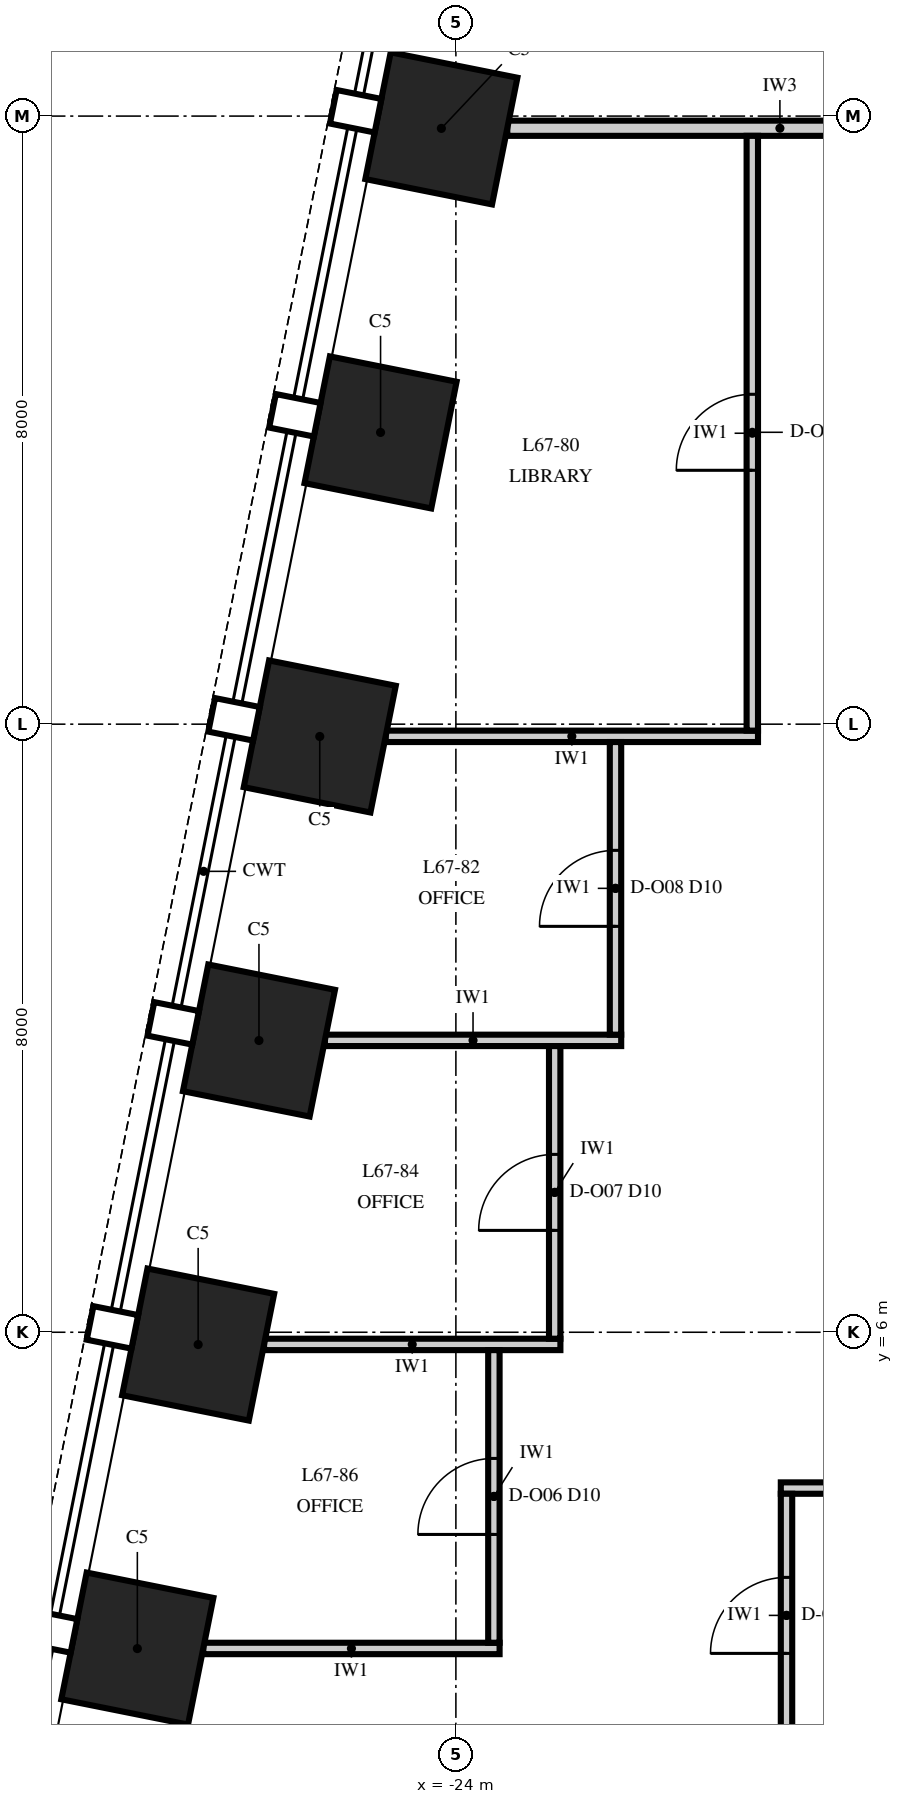
"""IFC4 building model, lengths in metres.
Left out: names, types, materials, properties, quantities, classifications, styles, units other than length and angle.
Written with IfcOpenShell. Run it as: python <this file> out.ifc"""

import sys

from ifc_helpers import new_model, si_unit, direction, frame, frame_2d, origin, origin_2d, place, context, subcontext, project, spatial, rectangle, extrude, element, fill, save


model = new_model("IFC4")
c1 = context("Model", 3, precision=1e-05, world=origin(), true_north=direction((0.0, 1.0)))
c2 = subcontext(c1, "Body", "Model", "MODEL_VIEW")
j1 = project(units=[si_unit("LENGTHUNIT", "METRE"), si_unit("PLANEANGLEUNIT", "RADIAN")], contexts=[c1])
p1 = place(None, origin())
s1 = spatial("IfcSite", under=j1, at=p1, CompositionType="ELEMENT")
p2 = place(p1, origin())
s2 = spatial("IfcBuilding", under=s1, at=p2, CompositionType="ELEMENT")
p3 = place(p2, frame((0.0, 0.0, 288.0)))
s3 = spatial("IfcBuildingStorey", under=s2, at=p3, CompositionType="ELEMENT", Elevation=288.0)
for number, where, z_axis, x_axis in (
    (1, (-24.191, 21.838, 0.0), (0.0, 0.0, 1.0), (-0.196, -0.981, 0.0)),
    (2, (-24.991, 17.838, 0.0), (0.0, 0.0, 1.0), (-0.196, -0.981, 0.0)),
    (3, (-25.791, 13.838, 0.0), (0.0, 0.0, 1.0), (-0.196, -0.981, 0.0)),
    (4, (-26.591, 9.838, 0.0), (0.0, 0.0, 1.0), (-0.196, -0.981, 0.0)),
    (5, (-27.391, 5.838, 0.0), (0.0, 0.0, 1.0), (-0.196, -0.981, 0.0)),
    (6, (-28.191, 1.838, 0.0), (0.0, 0.0, 1.0), (-0.196, -0.981, 0.0)),
):
    element("IfcColumn", number, at=place(p3, frame(where, z_axis=z_axis, x_axis=x_axis)), inside=s3, PredefinedType="COLUMN", context=c2, shape_type="SweptSolid", body=[
        extrude(rectangle(XDim=1.7, YDim=1.7, at=origin_2d()), origin(), (0.0, 0.0, 1.0), 4.0),
    ])
p4 = place(p3, frame((-27.324, 1.84, 0.0), z_axis=(0.0, 0.0, 1.0), x_axis=(1.0, 0.0, 0.0)))
e7 = element("IfcWall", 7, at=p4, inside=s3, PredefinedType="PARTITIONING", context=c2, shape_type="SweptSolid", body=[
    extrude(rectangle(XDim=3.899, YDim=0.15, at=frame_2d((1.949, 0.0))), origin(), (0.0, 0.0, 1.0), 3.23),
])
p5 = place(p3, frame((-19.725, 3.95, 0.0), z_axis=(0.0, 0.0, 1.0), x_axis=(1.0, 0.0, 0.0)))
e8 = element("IfcWall", 8, at=p5, inside=s3, PredefinedType="PARTITIONING", context=c2, shape_type="SweptSolid", body=[
    extrude(rectangle(XDim=3.675, YDim=0.15, at=frame_2d((1.837, 0.0))), origin(), (0.0, 0.0, 1.0), 3.23),
])
p6 = place(p3, frame((-26.524, 5.84, 0.0), z_axis=(0.0, 0.0, 1.0), x_axis=(1.0, 0.0, 0.0)))
e9 = element("IfcWall", 9, at=p6, inside=s3, PredefinedType="PARTITIONING", context=c2, shape_type="SweptSolid", body=[
    extrude(rectangle(XDim=3.899, YDim=0.15, at=frame_2d((1.949, 0.0))), origin(), (0.0, 0.0, 1.0), 2.842),
])
p7 = place(p3, frame((-25.724, 9.84, 0.0), z_axis=(0.0, 0.0, 1.0), x_axis=(1.0, 0.0, 0.0)))
e10 = element("IfcWall", 10, at=p7, inside=s3, PredefinedType="PARTITIONING", context=c2, shape_type="SweptSolid", body=[
    extrude(rectangle(XDim=3.899, YDim=0.15, at=frame_2d((1.949, 0.0))), origin(), (0.0, 0.0, 1.0), 3.23),
])
p8 = place(p3, frame((-24.924, 13.84, 0.0), z_axis=(0.0, 0.0, 1.0), x_axis=(1.0, 0.0, 0.0)))
e11 = element("IfcWall", 11, at=p8, inside=s3, PredefinedType="PARTITIONING", context=c2, shape_type="SweptSolid", body=[
    extrude(rectangle(XDim=4.899, YDim=0.15, at=frame_2d((2.449, 0.0))), origin(), (0.0, 0.0, 1.0), 3.23),
])
p9 = place(p3, frame((-23.324, 21.84, 0.0), z_axis=(0.0, 0.0, 1.0), x_axis=(1.0, 0.0, 0.0)))
e12 = element("IfcWall", 12, at=p9, inside=s3, PredefinedType="PARTITIONING", context=c2, shape_type="SweptSolid", body=[
    extrude(rectangle(XDim=7.174, YDim=0.2, at=frame_2d((3.587, 0.0))), origin(), (0.0, 0.0, 1.0), 3.23),
])
p10 = place(p3, frame((-23.5, 1.915, 0.0), z_axis=(0.0, 0.0, 1.0), x_axis=(0.0, 1.0, 0.0)))
e13 = element("IfcWall", 13, at=p10, inside=s3, PredefinedType="PARTITIONING", context=c2, shape_type="SweptSolid", body=[
    extrude(rectangle(XDim=3.85, YDim=0.15, at=frame_2d((1.925, 0.0))), origin(), (0.0, 0.0, 1.0), 3.85),
])
p11 = place(p10, frame((1.425, 0.0, 0.0)))
e14 = element("IfcOpeningElement", 14, at=p11, cuts=e13, PredefinedType="OPENING", context=c2, shape_type="SweptSolid", body=[
    extrude(rectangle(XDim=1.0, YDim=2.3, at=frame_2d((0.5, 1.15))), frame((0.0, 0.09, 0.0), z_axis=(0.0, -1.0, 0.0), x_axis=(1.0, 0.0, 0.0)), (0.0, 0.0, 1.0), 0.18),
])
p12 = place(p3, frame((-22.7, 5.915, 0.0), z_axis=(0.0, 0.0, 1.0), x_axis=(0.0, 1.0, 0.0)))
e15 = element("IfcWall", 15, at=p12, inside=s3, PredefinedType="PARTITIONING", context=c2, shape_type="SweptSolid", body=[
    extrude(rectangle(XDim=3.85, YDim=0.15, at=frame_2d((1.925, 0.0))), origin(), (0.0, 0.0, 1.0), 2.842),
])
p13 = place(p12, frame((1.425, 0.0, 0.0)))
e16 = element("IfcOpeningElement", 16, at=p13, cuts=e15, PredefinedType="OPENING", context=c2, shape_type="SweptSolid", body=[
    extrude(rectangle(XDim=1.0, YDim=2.3, at=frame_2d((0.5, 1.15))), frame((0.0, 0.09, 0.0), z_axis=(0.0, -1.0, 0.0), x_axis=(1.0, 0.0, 0.0)), (0.0, 0.0, 1.0), 0.18),
])
p14 = place(p3, frame((-21.9, 9.915, 0.0), z_axis=(0.0, 0.0, 1.0), x_axis=(0.0, 1.0, 0.0)))
e17 = element("IfcWall", 17, at=p14, inside=s3, PredefinedType="PARTITIONING", context=c2, shape_type="SweptSolid", body=[
    extrude(rectangle(XDim=3.85, YDim=0.15, at=frame_2d((1.925, 0.0))), origin(), (0.0, 0.0, 1.0), 3.85),
])
p15 = place(p14, frame((1.425, 0.0, 0.0)))
e18 = element("IfcOpeningElement", 18, at=p15, cuts=e17, PredefinedType="OPENING", context=c2, shape_type="SweptSolid", body=[
    extrude(rectangle(XDim=1.0, YDim=2.3, at=frame_2d((0.5, 1.15))), frame((0.0, 0.09, 0.0), z_axis=(0.0, -1.0, 0.0), x_axis=(1.0, 0.0, 0.0)), (0.0, 0.0, 1.0), 0.18),
])
p16 = place(p3, frame((-20.1, 13.915, 0.0), z_axis=(0.0, 0.0, 1.0), x_axis=(0.0, 1.0, 0.0)))
e19 = element("IfcWall", 19, at=p16, inside=s3, PredefinedType="PARTITIONING", context=c2, shape_type="SweptSolid", body=[
    extrude(rectangle(XDim=7.825, YDim=0.15, at=frame_2d((3.913, 0.0))), origin(), (0.0, 0.0, 1.0), 3.23),
])
p17 = place(p16, frame((3.425, 0.0, 0.0)))
e20 = element("IfcOpeningElement", 20, at=p17, cuts=e19, PredefinedType="OPENING", context=c2, shape_type="SweptSolid", body=[
    extrude(rectangle(XDim=1.0, YDim=2.3, at=frame_2d((0.5, 1.15))), frame((0.0, 0.09, 0.0), z_axis=(0.0, -1.0, 0.0), x_axis=(1.0, 0.0, 0.0)), (0.0, 0.0, 1.0), 0.18),
])
p18 = place(p3, frame((-19.65, 0.675, 0.0), z_axis=(0.0, 0.0, 1.0), x_axis=(0.0, 1.0, 0.0)))
e21 = element("IfcWall", 21, at=p18, inside=s3, PredefinedType="PARTITIONING", context=c2, shape_type="SweptSolid", body=[
    extrude(rectangle(XDim=3.2, YDim=0.15, at=frame_2d((1.6, 0.0))), origin(), (0.0, 0.0, 1.0), 3.85),
])
p19 = place(p18, frame((1.1, 0.0, 0.0)))
e22 = element("IfcOpeningElement", 22, at=p19, cuts=e21, PredefinedType="OPENING", context=c2, shape_type="SweptSolid", body=[
    extrude(rectangle(XDim=1.0, YDim=2.3, at=frame_2d((0.5, 1.15))), frame((0.0, 0.09, 0.0), z_axis=(0.0, -1.0, 0.0), x_axis=(1.0, 0.0, 0.0)), (0.0, 0.0, 1.0), 0.18),
])
p20 = place(p11, origin())
e23 = element("IfcDoor", 23, at=p20, inside=s3, OperationType="SINGLE_SWING_LEFT", PredefinedType="DOOR", context=c2, shape_type="SweptSolid", body=[
    extrude(rectangle(XDim=1.0, YDim=2.3, at=frame_2d((0.5, 1.15))), frame((0.0, 0.075, 0.0), z_axis=(0.0, -1.0, 0.0), x_axis=(1.0, 0.0, 0.0)), (0.0, 0.0, 1.0), 0.149),
])
fill(e14, e23)
p21 = place(p13, origin())
e24 = element("IfcDoor", 24, at=p21, inside=s3, OperationType="SINGLE_SWING_LEFT", PredefinedType="DOOR", context=c2, shape_type="SweptSolid", body=[
    extrude(rectangle(XDim=1.0, YDim=2.3, at=frame_2d((0.5, 1.15))), frame((0.0, 0.075, 0.0), z_axis=(0.0, -1.0, 0.0), x_axis=(1.0, 0.0, 0.0)), (0.0, 0.0, 1.0), 0.149),
])
fill(e16, e24)
p22 = place(p15, origin())
e25 = element("IfcDoor", 25, at=p22, inside=s3, OperationType="SINGLE_SWING_LEFT", PredefinedType="DOOR", context=c2, shape_type="SweptSolid", body=[
    extrude(rectangle(XDim=1.0, YDim=2.3, at=frame_2d((0.5, 1.15))), frame((0.0, 0.075, 0.0), z_axis=(0.0, -1.0, 0.0), x_axis=(1.0, 0.0, 0.0)), (0.0, 0.0, 1.0), 0.149),
])
fill(e18, e25)
p23 = place(p17, origin())
e26 = element("IfcDoor", 26, at=p23, inside=s3, OperationType="SINGLE_SWING_LEFT", PredefinedType="DOOR", context=c2, shape_type="SweptSolid", body=[
    extrude(rectangle(XDim=1.0, YDim=2.3, at=frame_2d((0.5, 1.15))), frame((0.0, 0.075, 0.0), z_axis=(0.0, -1.0, 0.0), x_axis=(1.0, 0.0, 0.0)), (0.0, 0.0, 1.0), 0.149),
])
fill(e20, e26)
p24 = place(p19, origin())
e27 = element("IfcDoor", 27, at=p24, inside=s3, OperationType="SINGLE_SWING_LEFT", PredefinedType="DOOR", context=c2, shape_type="SweptSolid", body=[
    extrude(rectangle(XDim=1.0, YDim=2.3, at=frame_2d((0.5, 1.15))), frame((0.0, 0.075, 0.0), z_axis=(0.0, -1.0, 0.0), x_axis=(1.0, 0.0, 0.0)), (0.0, 0.0, 1.0), 0.149),
])
fill(e22, e27)
save(model, sys.argv[1])
